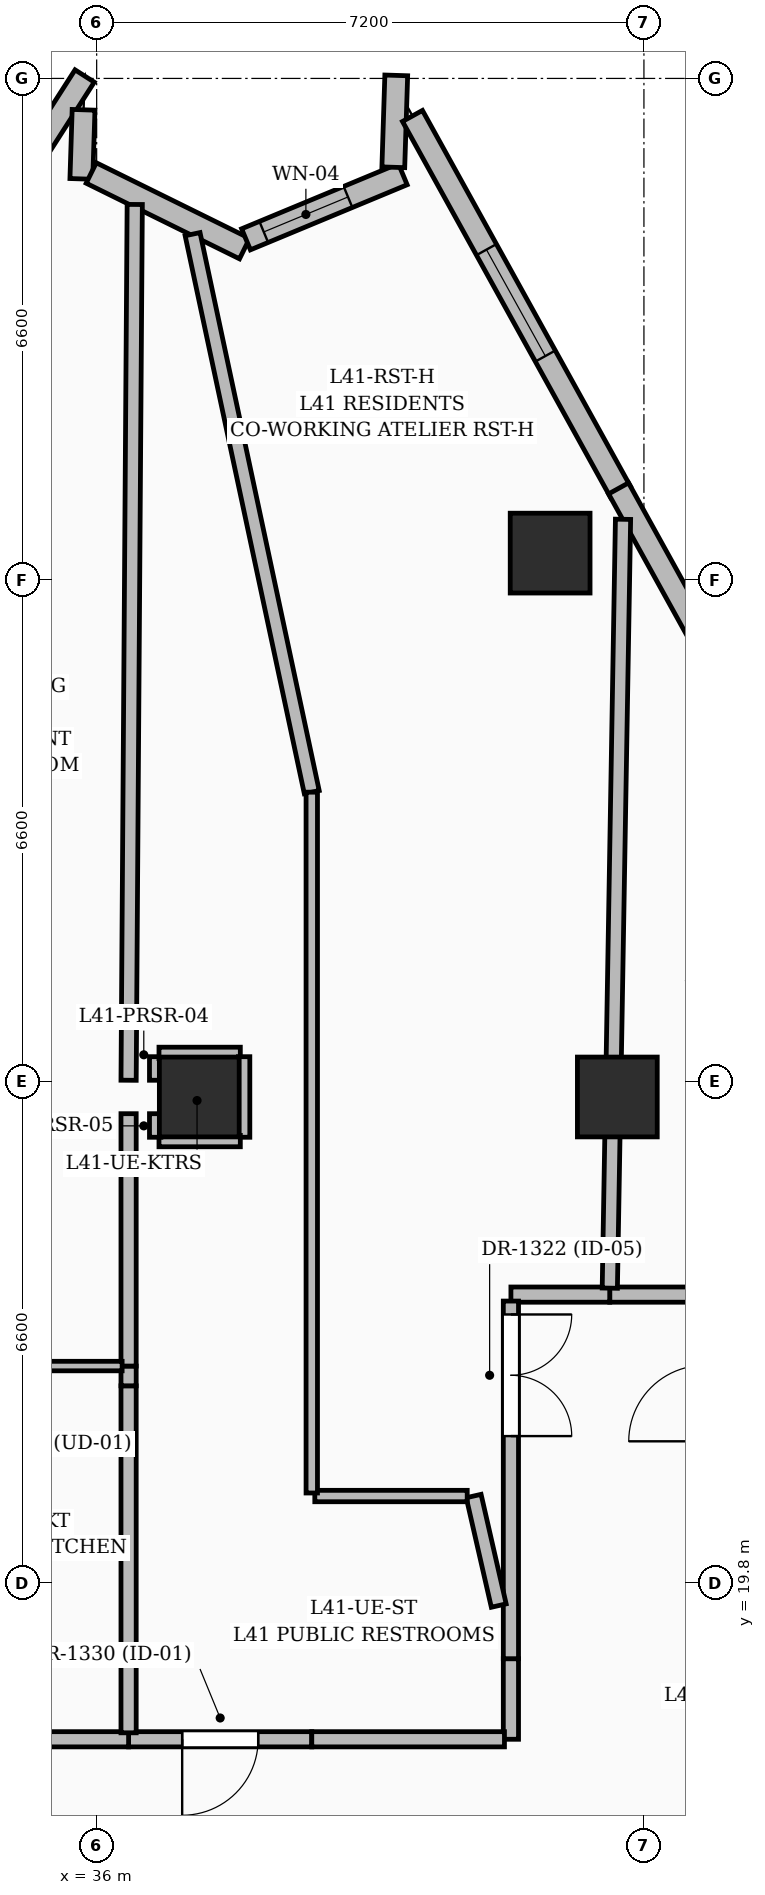
"""IFC4 building model, lengths in metres.
Left out: names, types, materials, properties, quantities, classifications, styles, units other than length and angle.
Written with IfcOpenShell. Run it as: python <this file> out.ifc"""

import sys

from ifc_helpers import new_model, si_unit, direction, frame, frame_2d, origin, origin_2d, place, context, subcontext, project, spatial, rectangle, extrude, element, fill, save


model = new_model("IFC4")
c1 = context("Model", 3, precision=1e-05, world=origin(), true_north=direction((0.0, 1.0)))
c2 = subcontext(c1, "Body", "Model", "MODEL_VIEW")
j1 = project(units=[si_unit("LENGTHUNIT", "METRE"), si_unit("PLANEANGLEUNIT", "RADIAN")], contexts=[c1])
p1 = place(None, origin())
s1 = spatial("IfcSite", under=j1, at=p1, CompositionType="ELEMENT")
p2 = place(p1, origin())
s2 = spatial("IfcBuilding", under=s1, at=p2, CompositionType="ELEMENT")
p3 = place(p2, frame((0.0, 0.0, 160.8)))
s3 = spatial("IfcBuildingStorey", under=s2, at=p3, CompositionType="ELEMENT", Elevation=160.8)
for number, where, z_axis, x_axis in (
    (1, (42.85, 26.2, 0.0), (0.0, 0.0, 1.0), (1.0, 0.0, 0.0)),
    (2, (37.35, 26.2, 0.0), (0.0, 0.0, 1.0), (1.0, 0.0, 0.0)),
    (3, (41.966, 33.355, 0.0), (0.0, 0.0, 1.0), (1.0, 0.0, 0.0)),
):
    element("IfcColumn", number, at=place(p3, frame(where, z_axis=z_axis, x_axis=x_axis)), inside=s3, PredefinedType="COLUMN", context=c2, shape_type="SweptSolid", body=[
        extrude(rectangle(XDim=1.05, YDim=1.05, at=origin_2d()), origin(), (0.0, 0.0, 1.0), 3.6),
    ])
p4 = place(p3, frame((32.455, 34.345, 0.0), z_axis=(0.0, 0.0, 1.0), x_axis=(0.539489448276, 0.841992360535, 0.0)))
e4 = element("IfcWall", 4, at=p4, inside=s3, PredefinedType="SOLIDWALL", context=c2, shape_type="SweptSolid", body=[
    extrude(rectangle(XDim=6.279, YDim=0.3, at=frame_2d((3.14, 0.0))), origin(), (0.0, 0.0, 1.0), 3.35),
])
p5 = place(p4, frame((1.9, 0.0, 0.6)))
e5 = element("IfcOpeningElement", 5, at=p5, cuts=e4, PredefinedType="OPENING", context=c2, shape_type="SweptSolid", body=[
    extrude(rectangle(XDim=1.5, YDim=2.1, at=frame_2d((0.75, 1.05))), frame((0.0, 0.16, 0.0), z_axis=(0.0, -1.0, 0.0), x_axis=(1.0, 0.0, 0.0)), (0.0, 0.0, 1.0), 0.32),
])
p6 = place(p3, frame((35.828, 39.187, 0.0), z_axis=(0.0, 0.0, 1.0), x_axis=(-0.031938584897, -0.999489833262, 0.0)))
e6 = element("IfcWall", 6, at=p6, inside=s3, PredefinedType="SOLIDWALL", context=c2, shape_type="SweptSolid", body=[
    extrude(rectangle(XDim=0.91, YDim=0.3, at=frame_2d((0.455, 0.0))), origin(), (0.0, 0.0, 1.0), 3.35),
])
p7 = place(p3, frame((35.928, 38.356, 0.0), z_axis=(0.0, 0.0, 1.0), x_axis=(0.896845505116, -0.442343915922, 0.0)))
e7 = element("IfcWall", 7, at=p7, inside=s3, PredefinedType="SOLIDWALL", context=c2, shape_type="SweptSolid", body=[
    extrude(rectangle(XDim=2.249, YDim=0.3, at=frame_2d((1.125, 0.0))), origin(), (0.0, 0.0, 1.0), 3.35),
])
p8 = place(p3, frame((37.965, 37.483, 0.0), z_axis=(0.0, 0.0, 1.0), x_axis=(0.923541991646, 0.383497313766, 0.0)))
e8 = element("IfcWall", 8, at=p8, inside=s3, PredefinedType="SOLIDWALL", context=c2, shape_type="SweptSolid", body=[
    extrude(rectangle(XDim=2.233, YDim=0.3, at=frame_2d((1.117, 0.0))), origin(), (0.0, 0.0, 1.0), 3.35),
])
p9 = place(p8, frame((0.253, 0.0, 0.8)))
e9 = element("IfcOpeningElement", 9, at=p9, cuts=e8, PredefinedType="OPENING", context=c2, shape_type="SweptSolid", body=[
    extrude(rectangle(XDim=1.2, YDim=1.8, at=frame_2d((0.6, 0.9))), frame((0.0, 0.16, 0.0), z_axis=(0.0, -1.0, 0.0), x_axis=(1.0, 0.0, 0.0)), (0.0, 0.0, 1.0), 0.32),
])
p10 = place(p3, frame((39.903, 38.431, 0.0), z_axis=(0.0, 0.0, 1.0), x_axis=(0.032091701063, 0.999484928712, 0.0)))
e10 = element("IfcWall", 10, at=p10, inside=s3, PredefinedType="SOLIDWALL", context=c2, shape_type="SweptSolid", body=[
    extrude(rectangle(XDim=1.21, YDim=0.3, at=frame_2d((0.605, 0.0))), origin(), (0.0, 0.0, 1.0), 3.35),
])
p11 = place(p3, frame((40.155, 39.106, 0.0), z_axis=(0.0, 0.0, 1.0), x_axis=(0.484204903903, -0.874954633702, 0.0)))
e11 = element("IfcWall", 11, at=p11, inside=s3, PredefinedType="SOLIDWALL", context=c2, shape_type="SweptSolid", body=[
    extrude(rectangle(XDim=5.653, YDim=0.3, at=frame_2d((2.827, 0.0))), origin(), (0.0, 0.0, 1.0), 3.35),
])
p12 = place(p11, frame((2.01, 0.0, 0.55)))
e12 = element("IfcOpeningElement", 12, at=p12, cuts=e11, PredefinedType="OPENING", context=c2, shape_type="SweptSolid", body=[
    extrude(rectangle(XDim=1.6, YDim=2.2, at=frame_2d((0.8, 1.1))), frame((0.0, 0.16, 0.0), z_axis=(0.0, -1.0, 0.0), x_axis=(1.0, 0.0, 0.0)), (0.0, 0.0, 1.0), 0.32),
])
p13 = place(p3, frame((42.866, 34.206, 0.0), z_axis=(0.0, 0.0, 1.0), x_axis=(0.484193476584, -0.874960957548, 0.0)))
e13 = element("IfcWall", 13, at=p13, inside=s3, PredefinedType="SOLIDWALL", context=c2, shape_type="SweptSolid", body=[
    extrude(rectangle(XDim=5.48, YDim=0.3, at=frame_2d((2.74, 0.0))), origin(), (0.0, 0.0, 1.0), 3.35),
])
p14 = place(p13, frame((2.295, 0.0, 0.6)))
e14 = element("IfcOpeningElement", 14, at=p14, cuts=e13, PredefinedType="OPENING", context=c2, shape_type="SweptSolid", body=[
    extrude(rectangle(XDim=1.5, YDim=2.1, at=frame_2d((0.75, 1.05))), frame((0.0, 0.16, 0.0), z_axis=(0.0, -1.0, 0.0), x_axis=(1.0, 0.0, 0.0)), (0.0, 0.0, 1.0), 0.32),
])
p15 = place(p3, frame((38.83, 17.75, 0.0), z_axis=(0.0, 0.0, 1.0), x_axis=(-1.0, 0.0, 0.0)))
e15 = element("IfcWall", 15, at=p15, inside=s3, PredefinedType="PARTITIONING", context=c2, shape_type="SweptSolid", body=[
    extrude(rectangle(XDim=2.41, YDim=0.2, at=frame_2d((1.205, 0.0))), origin(), (0.0, 0.0, 1.0), 3.35),
])
p16 = place(p15, frame((0.705, 0.0, 0.0)))
e16 = element("IfcOpeningElement", 16, at=p16, cuts=e15, PredefinedType="OPENING", context=c2, shape_type="SweptSolid", body=[
    extrude(rectangle(XDim=1.0, YDim=2.2, at=frame_2d((0.5, 1.1))), frame((0.0, 0.11, 0.0), z_axis=(0.0, -1.0, 0.0), x_axis=(1.0, 0.0, 0.0)), (0.0, 0.0, 1.0), 0.22),
])
p17 = place(p3, frame((41.45, 18.81, 0.0), z_axis=(0.0, 0.0, 1.0), x_axis=(0.0, -1.0, 0.0)))
e17 = element("IfcWall", 17, at=p17, inside=s3, PredefinedType="PARTITIONING", context=c2, shape_type="SweptSolid", body=[
    extrude(rectangle(XDim=1.06, YDim=0.2, at=frame_2d((0.53, 0.0))), origin(), (0.0, 0.0, 1.0), 3.35),
])
p18 = place(p3, frame((41.365, 17.75, 0.0), z_axis=(0.0, 0.0, 1.0), x_axis=(-1.0, 0.0, 0.0)))
e18 = element("IfcWall", 18, at=p18, inside=s3, PredefinedType="PARTITIONING", context=c2, shape_type="SweptSolid", body=[
    extrude(rectangle(XDim=2.535, YDim=0.2, at=frame_2d((1.268, 0.0))), origin(), (0.0, 0.0, 1.0), 3.35),
])
p19 = place(p3, frame((43.915, 23.6, 0.0), z_axis=(0.0, 0.0, 1.0), x_axis=(-1.0, 0.0, 0.0)))
e19 = element("IfcWall", 19, at=p19, inside=s3, PredefinedType="PARTITIONING", context=c2, shape_type="SweptSolid", body=[
    extrude(rectangle(XDim=1.165, YDim=0.2, at=frame_2d((0.583, 0.0))), origin(), (0.0, 0.0, 1.0), 2.436),
])
p20 = place(p3, frame((36.42, 17.75, 0.0), z_axis=(0.0, 0.0, 1.0), x_axis=(-1.0, 0.0, 0.0)))
e20 = element("IfcWall", 20, at=p20, inside=s3, PredefinedType="PARTITIONING", context=c2, shape_type="SweptSolid", body=[
    extrude(rectangle(XDim=2.8, YDim=0.2, at=frame_2d((1.4, 0.0))), origin(), (0.0, 0.0, 1.0), 2.436),
])
p21 = place(p3, frame((42.75, 23.6, 0.0), z_axis=(0.0, 0.0, 1.0), x_axis=(-1.0, 0.0, 0.0)))
e21 = element("IfcWall", 21, at=p21, inside=s3, PredefinedType="PARTITIONING", context=c2, shape_type="SweptSolid", body=[
    extrude(rectangle(XDim=1.3, YDim=0.2, at=frame_2d((0.65, 0.0))), origin(), (0.0, 0.0, 1.0), 3.35),
])
p22 = place(p3, frame((41.45, 23.515, 0.0), z_axis=(0.0, 0.0, 1.0), x_axis=(0.0, -1.0, 0.0)))
e22 = element("IfcWall", 22, at=p22, inside=s3, PredefinedType="PARTITIONING", context=c2, shape_type="SweptSolid", body=[
    extrude(rectangle(XDim=4.705, YDim=0.2, at=frame_2d((2.353, 0.0))), origin(), (0.0, 0.0, 1.0), 2.853),
])
p23 = place(p22, frame((0.176, 0.0, 0.0)))
e23 = element("IfcOpeningElement", 23, at=p23, cuts=e22, PredefinedType="OPENING", context=c2, shape_type="SweptSolid", body=[
    extrude(rectangle(XDim=1.6, YDim=2.3, at=frame_2d((0.8, 1.15))), frame((0.0, 0.11, 0.0), z_axis=(0.0, -1.0, 0.0), x_axis=(1.0, 0.0, 0.0)), (0.0, 0.0, 1.0), 0.22),
])
p24 = place(p3, frame((36.42, 22.4, 0.0), z_axis=(0.0, 0.0, 1.0), x_axis=(0.0, -1.0, 0.0)))
e24 = element("IfcWall", 24, at=p24, inside=s3, PredefinedType="PARTITIONING", context=c2, shape_type="SweptSolid", body=[
    extrude(rectangle(XDim=4.565, YDim=0.2, at=frame_2d((2.282, 0.0))), origin(), (0.0, 0.0, 1.0), 2.853),
])
p25 = place(p3, frame((36.42, 22.66, 0.0), z_axis=(0.0, 0.0, 1.0), x_axis=(0.0, -1.0, 0.0)))
e25 = element("IfcWall", 25, at=p25, inside=s3, PredefinedType="PARTITIONING", context=c2, shape_type="SweptSolid", body=[
    extrude(rectangle(XDim=0.26, YDim=0.2, at=frame_2d((0.13, 0.0))), origin(), (0.0, 0.0, 1.0), 3.35),
])
p26 = place(p3, frame((36.42, 25.98, 0.0), z_axis=(0.0, 0.0, 1.0), x_axis=(0.0, -1.0, 0.0)))
e26 = element("IfcWall", 26, at=p26, inside=s3, PredefinedType="PARTITIONING", context=c2, shape_type="SweptSolid", body=[
    extrude(rectangle(XDim=3.32, YDim=0.2, at=frame_2d((1.66, 0.0))), origin(), (0.0, 0.0, 1.0), 2.436),
])
p27 = place(p3, frame((36.501, 37.942, 0.0), z_axis=(0.0, 0.0, 1.0), x_axis=(-0.007034618495, -0.999975256765, 0.0)))
e27 = element("IfcWall", 27, at=p27, inside=s3, PredefinedType="PARTITIONING", context=c2, shape_type="SweptSolid", body=[
    extrude(rectangle(XDim=11.522, YDim=0.2, at=frame_2d((5.761, 0.0))), origin(), (0.0, 0.0, 1.0), 2.393),
])
p28 = place(p3, frame((38.83, 30.21, 0.0), z_axis=(0.0, 0.0, 1.0), x_axis=(-0.208896033751, 0.977937854407, 0.0)))
e28 = element("IfcWall", 28, at=p28, inside=s3, PredefinedType="PARTITIONING", context=c2, shape_type="SweptSolid", body=[
    extrude(rectangle(XDim=7.507, YDim=0.2, at=frame_2d((3.753, 0.0))), origin(), (0.0, 0.0, 1.0), 2.57),
])
p29 = place(p3, frame((41.29, 19.509, 0.0), z_axis=(0.0, 0.0, 1.0), x_axis=(-0.223291159638, 0.974751793036, 0.0)))
e29 = element("IfcWall", 29, at=p29, inside=s3, PredefinedType="PARTITIONING", context=c2, shape_type="SweptSolid", body=[
    extrude(rectangle(XDim=1.478, YDim=0.2, at=frame_2d((0.739, 0.0))), origin(), (0.0, 0.0, 1.0), 2.853),
])
p30 = place(p3, frame((42.925, 33.8, 0.0), z_axis=(0.0, 0.0, 1.0), x_axis=(-0.017206788201, -0.999851952261, 0.0)))
e30 = element("IfcWall", 30, at=p30, inside=s3, PredefinedType="PARTITIONING", context=c2, shape_type="SweptSolid", body=[
    extrude(rectangle(XDim=10.116, YDim=0.2, at=frame_2d((5.058, 0.0))), origin(), (0.0, 0.0, 1.0), 2.393),
])
p31 = place(p3, frame((36.335, 22.66, 0.0), z_axis=(0.0, 0.0, 1.0), x_axis=(-1.0, 0.0, 0.0)))
e31 = element("IfcWall", 31, at=p31, inside=s3, PredefinedType="PARTITIONING", context=c2, shape_type="SweptSolid", body=[
    extrude(rectangle(XDim=3.087, YDim=0.125, at=frame_2d((1.544, 0.0))), origin(), (0.0, 0.0, 1.0), 2.436),
])
p32 = place(p31, frame((0.991, 0.0, 0.0)))
e32 = element("IfcOpeningElement", 32, at=p32, cuts=e31, PredefinedType="OPENING", context=c2, shape_type="SweptSolid", body=[
    extrude(rectangle(XDim=0.95, YDim=2.2, at=frame_2d((0.475, 1.1))), frame((0.0, 0.072, 0.0), z_axis=(0.0, -1.0, 0.0), x_axis=(1.0, 0.0, 0.0)), (0.0, 0.0, 1.0), 0.145),
])
p33 = place(p3, frame((36.77, 26.42, 0.0), z_axis=(0.0, 0.0, 1.0), x_axis=(0.0, 1.0, 0.0)))
e33 = element("IfcWall", 33, at=p33, inside=s3, PredefinedType="PARTITIONING", context=c2, shape_type="SweptSolid", body=[
    extrude(rectangle(XDim=0.31, YDim=0.15, at=frame_2d((0.155, 0.0))), origin(), (0.0, 0.0, 1.0), 2.393),
])
p34 = place(p3, frame((36.82, 26.78, 0.0), z_axis=(0.0, 0.0, 1.0), x_axis=(1.0, 0.0, 0.0)))
e34 = element("IfcWall", 34, at=p34, inside=s3, PredefinedType="PARTITIONING", context=c2, shape_type="SweptSolid", body=[
    extrude(rectangle(XDim=1.07, YDim=0.15, at=frame_2d((0.535, 0.0))), origin(), (0.0, 0.0, 1.0), 2.393),
])
p35 = place(p3, frame((37.94, 26.73, 0.0), z_axis=(0.0, 0.0, 1.0), x_axis=(0.0, -1.0, 0.0)))
e35 = element("IfcWall", 35, at=p35, inside=s3, PredefinedType="PARTITIONING", context=c2, shape_type="SweptSolid", body=[
    extrude(rectangle(XDim=1.06, YDim=0.15, at=frame_2d((0.53, 0.0))), origin(), (0.0, 0.0, 1.0), 2.436),
])
p36 = place(p3, frame((37.89, 25.62, 0.0), z_axis=(0.0, 0.0, 1.0), x_axis=(-1.0, 0.0, 0.0)))
e36 = element("IfcWall", 36, at=p36, inside=s3, PredefinedType="PARTITIONING", context=c2, shape_type="SweptSolid", body=[
    extrude(rectangle(XDim=1.07, YDim=0.15, at=frame_2d((0.535, 0.0))), origin(), (0.0, 0.0, 1.0), 2.436),
])
p37 = place(p3, frame((36.77, 25.67, 0.0), z_axis=(0.0, 0.0, 1.0), x_axis=(0.0, 1.0, 0.0)))
e37 = element("IfcWall", 37, at=p37, inside=s3, PredefinedType="PARTITIONING", context=c2, shape_type="SweptSolid", body=[
    extrude(rectangle(XDim=0.31, YDim=0.15, at=frame_2d((0.155, 0.0))), origin(), (0.0, 0.0, 1.0), 3.35),
])
p38 = place(p3, frame((40.875, 20.95, 0.0), z_axis=(0.0, 0.0, 1.0), x_axis=(-1.0, 0.0, 0.0)))
e38 = element("IfcWall", 38, at=p38, inside=s3, PredefinedType="PARTITIONING", context=c2, shape_type="SweptSolid", body=[
    extrude(rectangle(XDim=2.005, YDim=0.15, at=frame_2d((1.002, 0.0))), origin(), (0.0, 0.0, 1.0), 3.35),
])
p39 = place(p3, frame((38.83, 20.99, 0.0), z_axis=(0.0, 0.0, 1.0), x_axis=(0.0, 1.0, 0.0)))
e39 = element("IfcWall", 39, at=p39, inside=s3, PredefinedType="PARTITIONING", context=c2, shape_type="SweptSolid", body=[
    extrude(rectangle(XDim=9.22, YDim=0.15, at=frame_2d((4.61, 0.0))), origin(), (0.0, 0.0, 1.0), 2.436),
])
p40 = place(p9, origin())
e40 = element("IfcWindow", 40, at=p40, inside=s3, PartitioningType="SINGLE_PANEL", PredefinedType="WINDOW", context=c2, shape_type="SweptSolid", body=[
    extrude(rectangle(XDim=1.2, YDim=1.8, at=frame_2d((0.6, 0.9))), frame((0.0, 0.03, 0.0), z_axis=(0.0, -1.0, 0.0), x_axis=(1.0, 0.0, 0.0)), (0.0, 0.0, 1.0), 0.06),
])
fill(e9, e40)
p41 = place(p12, origin())
e41 = element("IfcWindow", 41, at=p41, inside=s3, PartitioningType="SINGLE_PANEL", PredefinedType="WINDOW", context=c2, shape_type="SweptSolid", body=[
    extrude(rectangle(XDim=1.6, YDim=2.2, at=frame_2d((0.8, 1.1))), frame((0.0, 0.03, 0.0), z_axis=(0.0, -1.0, 0.0), x_axis=(1.0, 0.0, 0.0)), (0.0, 0.0, 1.0), 0.06),
])
fill(e12, e41)
p42 = place(p23, origin())
e42 = element("IfcDoor", 42, at=p42, inside=s3, OperationType="DOUBLE_DOOR_SINGLE_SWING", PredefinedType="DOOR", context=c2, shape_type="SweptSolid", body=[
    extrude(rectangle(XDim=1.6, YDim=2.3, at=frame_2d((0.8, 1.15))), frame((0.0, 0.025, 0.0), z_axis=(0.0, -1.0, 0.0), x_axis=(1.0, 0.0, 0.0)), (0.0, 0.0, 1.0), 0.05),
])
fill(e23, e42)
p43 = place(p16, origin())
e43 = element("IfcDoor", 43, at=p43, inside=s3, OperationType="SINGLE_SWING_RIGHT", PredefinedType="DOOR", context=c2, shape_type="SweptSolid", body=[
    extrude(rectangle(XDim=1.0, YDim=2.2, at=frame_2d((0.5, 1.1))), frame((0.0, 0.025, 0.0), z_axis=(0.0, -1.0, 0.0), x_axis=(1.0, 0.0, 0.0)), (0.0, 0.0, 1.0), 0.05),
])
fill(e16, e43)
save(model, sys.argv[1])
